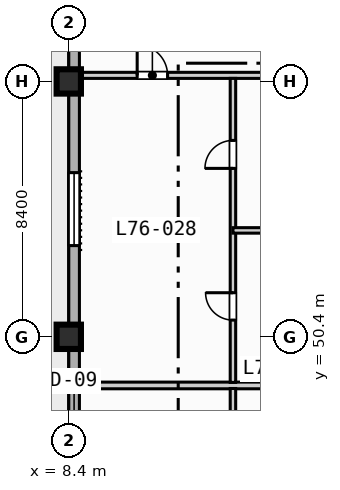
"""IFC4 building model, lengths in metres.
Left out: names, types, materials, properties, quantities, classifications, styles, units other than length and angle.
Written with IfcOpenShell. Run it as: python <this file> out.ifc"""

import sys

from ifc_helpers import new_model, si_unit, direction, frame, frame_2d, origin, origin_2d, place, context, subcontext, project, spatial, rectangle, extrude, element, fill, save


model = new_model("IFC4")
c1 = context("Model", 3, precision=1e-05, world=origin(), true_north=direction((0.0, 1.0)))
c2 = subcontext(c1, "Body", "Model", "MODEL_VIEW")
j1 = project(units=[si_unit("LENGTHUNIT", "METRE"), si_unit("PLANEANGLEUNIT", "RADIAN")], contexts=[c1])
p1 = place(None, origin())
s1 = spatial("IfcSite", under=j1, at=p1, CompositionType="ELEMENT")
p2 = place(p1, origin())
s2 = spatial("IfcBuilding", under=s1, at=p2, CompositionType="ELEMENT")
p3 = place(p2, frame((0.0, 0.0, 308.6)))
s3 = spatial("IfcBuildingStorey", under=s2, at=p3, CompositionType="ELEMENT", Elevation=308.6)
for number, where, z_axis, x_axis in (
    (1, (8.4, 50.4, 0.0), (0.0, 0.0, 1.0), (1.0, 0.0, 0.0)),
    (2, (8.4, 58.8, 0.0), (0.0, 0.0, 1.0), (1.0, 0.0, 0.0)),
):
    element("IfcColumn", number, at=place(p3, frame(where, z_axis=z_axis, x_axis=x_axis)), inside=s3, PredefinedType="COLUMN", context=c2, shape_type="SweptSolid", body=[
        extrude(rectangle(XDim=0.8, YDim=0.8, at=origin_2d()), origin(), (0.0, 0.0, 1.0), 3.9),
    ])
p4 = place(p3, frame((8.575, 11.575, 0.0), z_axis=(0.0, 0.0, 1.0), x_axis=(0.0, 1.0, 0.0)))
e3 = element("IfcWall", 3, at=p4, inside=s3, PredefinedType="STANDARD", context=c2, shape_type="SweptSolid", body=[
    extrude(rectangle(XDim=60.85, YDim=0.35, at=frame_2d((30.425, 0.0))), origin(), (0.0, 0.0, 1.0), 3.67),
])
p5 = place(p4, frame((33.925, 0.0, 0.0)))
e4 = element("IfcOpeningElement", 4, at=p5, cuts=e3, PredefinedType="OPENING", context=c2, shape_type="SweptSolid", body=[
    extrude(rectangle(XDim=1.4, YDim=2.2, at=frame_2d((0.7, 1.1))), frame((0.0, 0.185, 0.0), z_axis=(0.0, -1.0, 0.0), x_axis=(1.0, 0.0, 0.0)), (0.0, 0.0, 1.0), 0.37),
])
p6 = place(p4, frame((25.025, 0.0, 0.85)))
e5 = element("IfcOpeningElement", 5, at=p6, cuts=e3, PredefinedType="OPENING", context=c2, shape_type="SweptSolid", body=[
    extrude(rectangle(XDim=2.4, YDim=1.95, at=frame_2d((1.2, 0.975))), frame((0.0, 0.185, 0.0), z_axis=(0.0, -1.0, 0.0), x_axis=(1.0, 0.0, 0.0)), (0.0, 0.0, 1.0), 0.37),
])
p7 = place(p4, frame((41.825, 0.0, 0.85)))
e6 = element("IfcOpeningElement", 6, at=p7, cuts=e3, PredefinedType="OPENING", context=c2, shape_type="SweptSolid", body=[
    extrude(rectangle(XDim=2.4, YDim=1.95, at=frame_2d((1.2, 0.975))), frame((0.0, 0.185, 0.0), z_axis=(0.0, -1.0, 0.0), x_axis=(1.0, 0.0, 0.0)), (0.0, 0.0, 1.0), 0.37),
])
p8 = place(p3, frame((8.65, 59.0, 0.0), z_axis=(0.0, 0.0, 1.0), x_axis=(1.0, 0.0, 0.0)))
e7 = element("IfcWall", 7, at=p8, inside=s3, PredefinedType="PARTITIONING", context=c2, shape_type="SweptSolid", body=[
    extrude(rectangle(XDim=7.95, YDim=0.2, at=frame_2d((3.975, 0.0))), origin(), (0.0, 0.0, 1.0), 3.07),
])
p9 = place(p8, frame((2.0, 0.0, 0.0)))
e8 = element("IfcOpeningElement", 8, at=p9, cuts=e7, PredefinedType="OPENING", context=c2, shape_type="SweptSolid", body=[
    extrude(rectangle(XDim=1.0, YDim=2.15, at=frame_2d((0.5, 1.075))), frame((0.0, 0.11, 0.0), z_axis=(0.0, -1.0, 0.0), x_axis=(1.0, 0.0, 0.0)), (0.0, 0.0, 1.0), 0.22),
])
p10 = place(p3, frame((8.65, 48.8, 0.0), z_axis=(0.0, 0.0, 1.0), x_axis=(1.0, 0.0, 0.0)))
e9 = element("IfcWall", 9, at=p10, inside=s3, PredefinedType="PARTITIONING", context=c2, shape_type="SweptSolid", body=[
    extrude(rectangle(XDim=7.95, YDim=0.22, at=frame_2d((3.975, 0.0))), origin(), (0.0, 0.0, 1.0), 3.67),
])
p11 = place(p3, frame((13.8, 41.7, 0.0), z_axis=(0.0, 0.0, 1.0), x_axis=(0.0, 1.0, 0.0)))
e10 = element("IfcWall", 10, at=p11, inside=s3, PredefinedType="PLUMBINGWALL", context=c2, shape_type="SweptSolid", body=[
    extrude(rectangle(XDim=7.0, YDim=0.18, at=frame_2d((3.5, 0.0))), origin(), (0.0, 0.0, 1.0), 3.67),
])
p12 = place(p11, frame((1.3, 0.0, 0.0)))
e11 = element("IfcOpeningElement", 11, at=p12, cuts=e10, PredefinedType="OPENING", context=c2, shape_type="SweptSolid", body=[
    extrude(rectangle(XDim=0.9, YDim=2.1, at=frame_2d((0.45, 1.05))), frame((0.0, 0.1, 0.0), z_axis=(0.0, -1.0, 0.0), x_axis=(1.0, 0.0, 0.0)), (0.0, 0.0, 1.0), 0.2),
])
p13 = place(p11, frame((4.79, 0.0, 0.0)))
e12 = element("IfcOpeningElement", 12, at=p13, cuts=e10, PredefinedType="OPENING", context=c2, shape_type="SweptSolid", body=[
    extrude(rectangle(XDim=0.92, YDim=2.1, at=frame_2d((0.46, 1.05))), frame((0.0, 0.1, 0.0), z_axis=(0.0, -1.0, 0.0), x_axis=(1.0, 0.0, 0.0)), (0.0, 0.0, 1.0), 0.2),
])
p14 = place(p3, frame((13.8, 48.9, 0.0), z_axis=(0.0, 0.0, 1.0), x_axis=(0.0, 1.0, 0.0)))
e13 = element("IfcWall", 13, at=p14, inside=s3, PredefinedType="PLUMBINGWALL", context=c2, shape_type="SweptSolid", body=[
    extrude(rectangle(XDim=10.0, YDim=0.18, at=frame_2d((5.0, 0.0))), origin(), (0.0, 0.0, 1.0), 3.67),
])
p15 = place(p14, frame((2.05, 0.0, 0.0)))
e14 = element("IfcOpeningElement", 14, at=p15, cuts=e13, PredefinedType="OPENING", context=c2, shape_type="SweptSolid", body=[
    extrude(rectangle(XDim=0.9, YDim=2.1, at=frame_2d((0.45, 1.05))), frame((0.0, 0.1, 0.0), z_axis=(0.0, -1.0, 0.0), x_axis=(1.0, 0.0, 0.0)), (0.0, 0.0, 1.0), 0.2),
])
p16 = place(p14, frame((7.04, 0.0, 0.0)))
e15 = element("IfcOpeningElement", 15, at=p16, cuts=e13, PredefinedType="OPENING", context=c2, shape_type="SweptSolid", body=[
    extrude(rectangle(XDim=0.92, YDim=2.1, at=frame_2d((0.46, 1.05))), frame((0.0, 0.1, 0.0), z_axis=(0.0, -1.0, 0.0), x_axis=(1.0, 0.0, 0.0)), (0.0, 0.0, 1.0), 0.2),
])
p17 = place(p3, frame((13.8, 53.9, 0.0), z_axis=(0.0, 0.0, 1.0), x_axis=(1.0, 0.0, 0.0)))
e16 = element("IfcWall", 16, at=p17, inside=s3, PredefinedType="PLUMBINGWALL", context=c2, shape_type="SweptSolid", body=[
    extrude(rectangle(XDim=2.8, YDim=0.18, at=frame_2d((1.4, 0.0))), origin(), (0.0, 0.0, 1.0), 3.67),
])
p18 = place(p7, origin())
e17 = element("IfcWindow", 17, at=p18, inside=s3, PartitioningType="SINGLE_PANEL", PredefinedType="WINDOW", context=c2, shape_type="SweptSolid", body=[
    extrude(rectangle(XDim=2.4, YDim=1.95, at=frame_2d((1.2, 0.975))), frame((0.0, 0.03, 0.0), z_axis=(0.0, -1.0, 0.0), x_axis=(1.0, 0.0, 0.0)), (0.0, 0.0, 1.0), 0.06),
])
fill(e6, e17)
p19 = place(p9, origin())
e18 = element("IfcDoor", 18, at=p19, inside=s3, OperationType="SINGLE_SWING_LEFT", PredefinedType="DOOR", context=c2, shape_type="SweptSolid", body=[
    extrude(rectangle(XDim=1.0, YDim=2.15, at=frame_2d((0.5, 1.075))), frame((0.0, 0.025, 0.0), z_axis=(0.0, -1.0, 0.0), x_axis=(1.0, 0.0, 0.0)), (0.0, 0.0, 1.0), 0.05),
])
fill(e8, e18)
p20 = place(p15, origin())
e19 = element("IfcDoor", 19, at=p20, inside=s3, OperationType="SINGLE_SWING_RIGHT", PredefinedType="DOOR", context=c2, shape_type="SweptSolid", body=[
    extrude(rectangle(XDim=0.9, YDim=2.1, at=frame_2d((0.45, 1.05))), frame((0.0, 0.025, 0.0), z_axis=(0.0, -1.0, 0.0), x_axis=(1.0, 0.0, 0.0)), (0.0, 0.0, 1.0), 0.05),
])
fill(e14, e19)
p21 = place(p16, origin())
e20 = element("IfcDoor", 20, at=p21, inside=s3, OperationType="SINGLE_SWING_LEFT", PredefinedType="DOOR", context=c2, shape_type="SweptSolid", body=[
    extrude(rectangle(XDim=0.92, YDim=2.1, at=frame_2d((0.46, 1.05))), frame((0.0, 0.025, 0.0), z_axis=(0.0, -1.0, 0.0), x_axis=(1.0, 0.0, 0.0)), (0.0, 0.0, 1.0), 0.05),
])
fill(e15, e20)
save(model, sys.argv[1])
